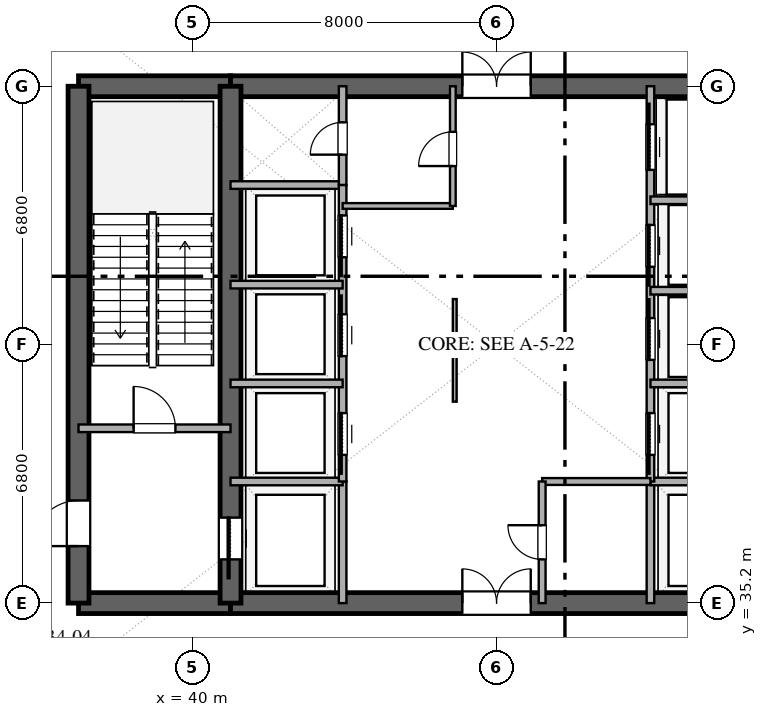
"""IFC4 building model, lengths in metres.
Left out: names, types, materials, properties, quantities, classifications, styles, units other than length and angle.
Written with IfcOpenShell. Run it as: python <this file> out.ifc"""

import sys

from ifc_helpers import new_model, si_unit, direction, frame, frame_2d, origin, place, context, subcontext, project, spatial, rectangle, extrude, element, fill, save


model = new_model("IFC4")
c1 = context("Model", 3, precision=1e-05, world=origin(), true_north=direction((0.0, 1.0)))
c2 = subcontext(c1, "Body", "Model", "MODEL_VIEW")
j1 = project(units=[si_unit("LENGTHUNIT", "METRE"), si_unit("PLANEANGLEUNIT", "RADIAN")], contexts=[c1])
p1 = place(None, origin())
s1 = spatial("IfcSite", under=j1, at=p1, CompositionType="ELEMENT")
p2 = place(p1, origin())
s2 = spatial("IfcBuilding", under=s1, at=p2, CompositionType="ELEMENT")
p3 = place(p2, frame((0.0, 0.0, 134.4)))
s3 = spatial("IfcBuildingStorey", under=s2, at=p3, CompositionType="ELEMENT", Elevation=134.4)
p4 = place(p3, frame((37.0, 35.2, 0.0), z_axis=(0.0, 0.0, 1.0), x_axis=(1.0, 0.0, 0.0)))
e1 = element("IfcWall", 1, at=p4, inside=s3, PredefinedType="SHEAR", context=c2, shape_type="SweptSolid", body=[
    extrude(rectangle(XDim=4.0, YDim=0.55, at=frame_2d((2.0, 0.0))), origin(), (0.0, 0.0, 1.0), 5.05),
])
p5 = place(p3, frame((41.0, 35.2, 0.0), z_axis=(0.0, 0.0, 1.0), x_axis=(1.0, 0.0, 0.0)))
e2 = element("IfcWall", 2, at=p5, inside=s3, PredefinedType="SHEAR", context=c2, shape_type="SweptSolid", body=[
    extrude(rectangle(XDim=14.0, YDim=0.55, at=frame_2d((7.0, 0.0))), origin(), (0.0, 0.0, 1.0), 5.05),
])
p6 = place(p5, frame((6.1, 0.0, 0.0)))
e3 = element("IfcOpeningElement", 3, at=p6, cuts=e2, PredefinedType="OPENING", context=c2, shape_type="SweptSolid", body=[
    extrude(rectangle(XDim=1.8, YDim=2.25, at=frame_2d((0.9, 1.125))), frame((0.0, 0.285, 0.0), z_axis=(0.0, -1.0, 0.0), x_axis=(1.0, 0.0, 0.0)), (0.0, 0.0, 1.0), 0.57),
])
p7 = place(p3, frame((37.0, 48.8, 0.0), z_axis=(0.0, 0.0, 1.0), x_axis=(1.0, 0.0, 0.0)))
e4 = element("IfcWall", 4, at=p7, inside=s3, PredefinedType="SHEAR", context=c2, shape_type="SweptSolid", body=[
    extrude(rectangle(XDim=4.0, YDim=0.55, at=frame_2d((2.0, 0.0))), origin(), (0.0, 0.0, 1.0), 5.05),
])
p8 = place(p3, frame((41.0, 48.8, 0.0), z_axis=(0.0, 0.0, 1.0), x_axis=(1.0, 0.0, 0.0)))
e5 = element("IfcWall", 5, at=p8, inside=s3, PredefinedType="SHEAR", context=c2, shape_type="SweptSolid", body=[
    extrude(rectangle(XDim=14.0, YDim=0.55, at=frame_2d((7.0, 0.0))), origin(), (0.0, 0.0, 1.0), 5.05),
])
p9 = place(p8, frame((6.1, 0.0, 0.0)))
e6 = element("IfcOpeningElement", 6, at=p9, cuts=e5, PredefinedType="OPENING", context=c2, shape_type="SweptSolid", body=[
    extrude(rectangle(XDim=1.8, YDim=2.25, at=frame_2d((0.9, 1.125))), frame((0.0, 0.285, 0.0), z_axis=(0.0, -1.0, 0.0), x_axis=(1.0, 0.0, 0.0)), (0.0, 0.0, 1.0), 0.57),
])
p10 = place(p3, frame((37.0, 35.2, 0.0), z_axis=(0.0, 0.0, 1.0), x_axis=(0.0, 1.0, 0.0)))
e7 = element("IfcWall", 7, at=p10, inside=s3, PredefinedType="SHEAR", context=c2, shape_type="SweptSolid", body=[
    extrude(rectangle(XDim=13.6, YDim=0.55, at=frame_2d((6.8, 0.0))), origin(), (0.0, 0.0, 1.0), 5.05),
])
p11 = place(p10, frame((1.5, 0.0, 0.0)))
e8 = element("IfcOpeningElement", 8, at=p11, cuts=e7, PredefinedType="OPENING", context=c2, shape_type="SweptSolid", body=[
    extrude(rectangle(XDim=1.2, YDim=2.15, at=frame_2d((0.6, 1.075))), frame((0.0, 0.285, 0.0), z_axis=(0.0, -1.0, 0.0), x_axis=(1.0, 0.0, 0.0)), (0.0, 0.0, 1.0), 0.57),
])
p12 = place(p3, frame((41.0, 35.2, 0.0), z_axis=(0.0, 0.0, 1.0), x_axis=(0.0, 1.0, 0.0)))
e9 = element("IfcWall", 9, at=p12, inside=s3, PredefinedType="SHEAR", context=c2, shape_type="SweptSolid", body=[
    extrude(rectangle(XDim=13.6, YDim=0.55, at=frame_2d((6.8, 0.0))), origin(), (0.0, 0.0, 1.0), 5.05),
])
p13 = place(p12, frame((1.15, 0.0, 0.0)))
e10 = element("IfcOpeningElement", 10, at=p13, cuts=e9, PredefinedType="OPENING", context=c2, shape_type="SweptSolid", body=[
    extrude(rectangle(XDim=1.1, YDim=2.2, at=frame_2d((0.55, 1.1))), frame((0.0, 0.285, 0.0), z_axis=(0.0, -1.0, 0.0), x_axis=(1.0, 0.0, 0.0)), (0.0, 0.0, 1.0), 0.57),
])
p14 = place(p3, frame((37.0, 39.8, 0.0), z_axis=(0.0, 0.0, 1.0), x_axis=(1.0, 0.0, 0.0)))
e11 = element("IfcWall", 11, at=p14, inside=s3, PredefinedType="SOLIDWALL", context=c2, shape_type="SweptSolid", body=[
    extrude(rectangle(XDim=4.0, YDim=0.2, at=frame_2d((2.0, 0.0))), origin(), (0.0, 0.0, 1.0), 4.35),
])
p15 = place(p14, frame((1.45, 0.0, 0.0)))
e12 = element("IfcOpeningElement", 12, at=p15, cuts=e11, PredefinedType="OPENING", context=c2, shape_type="SweptSolid", body=[
    extrude(rectangle(XDim=1.1, YDim=2.15, at=frame_2d((0.55, 1.075))), frame((0.0, 0.11, 0.0), z_axis=(0.0, -1.0, 0.0), x_axis=(1.0, 0.0, 0.0)), (0.0, 0.0, 1.0), 0.22),
])
p16 = place(p3, frame((43.95, 35.2, 0.0), z_axis=(0.0, 0.0, 1.0), x_axis=(0.0, 1.0, 0.0)))
e13 = element("IfcWall", 13, at=p16, inside=s3, PredefinedType="SOLIDWALL", context=c2, shape_type="SweptSolid", body=[
    extrude(rectangle(XDim=3.2, YDim=0.2, at=frame_2d((1.6, 0.0))), origin(), (0.0, 0.0, 1.0), 4.35),
])
p17 = place(p3, frame((41.0, 38.4, 0.0), z_axis=(0.0, 0.0, 1.0), x_axis=(1.0, 0.0, 0.0)))
e14 = element("IfcWall", 14, at=p17, inside=s3, PredefinedType="SOLIDWALL", context=c2, shape_type="SweptSolid", body=[
    extrude(rectangle(XDim=2.95, YDim=0.2, at=frame_2d((1.475, 0.0))), origin(), (0.0, 0.0, 1.0), 4.35),
])
p18 = place(p3, frame((52.05, 35.2, 0.0), z_axis=(0.0, 0.0, 1.0), x_axis=(0.0, 1.0, 0.0)))
e15 = element("IfcWall", 15, at=p18, inside=s3, PredefinedType="SOLIDWALL", context=c2, shape_type="SweptSolid", body=[
    extrude(rectangle(XDim=3.2, YDim=0.2, at=frame_2d((1.6, 0.0))), origin(), (0.0, 0.0, 1.0), 4.35),
])
for number, where, z_axis, x_axis in (
    (16, (52.05, 38.4, 0.0), (0.0, 0.0, 1.0), (1.0, 0.0, 0.0)),
    (17, (41.0, 46.2, 0.0), (0.0, 0.0, 1.0), (1.0, 0.0, 0.0)),
):
    element("IfcWall", number, at=place(p3, frame(where, z_axis=z_axis, x_axis=x_axis)), inside=s3, PredefinedType="SOLIDWALL", context=c2, shape_type="SweptSolid", body=[
        extrude(rectangle(XDim=2.95, YDim=0.2, at=frame_2d((1.475, 0.0))), origin(), (0.0, 0.0, 1.0), 4.35),
    ])
p19 = place(p3, frame((43.95, 46.2, 0.0), z_axis=(0.0, 0.0, 1.0), x_axis=(0.0, 1.0, 0.0)))
e18 = element("IfcWall", 18, at=p19, inside=s3, PredefinedType="SOLIDWALL", context=c2, shape_type="SweptSolid", body=[
    extrude(rectangle(XDim=2.6, YDim=0.2, at=frame_2d((1.3, 0.0))), origin(), (0.0, 0.0, 1.0), 4.35),
])
p20 = place(p19, frame((0.8, 0.0, 0.0)))
e19 = element("IfcOpeningElement", 19, at=p20, cuts=e18, PredefinedType="OPENING", context=c2, shape_type="SweptSolid", body=[
    extrude(rectangle(XDim=0.85, YDim=2.15, at=frame_2d((0.425, 1.075))), frame((0.0, 0.11, 0.0), z_axis=(0.0, -1.0, 0.0), x_axis=(1.0, 0.0, 0.0)), (0.0, 0.0, 1.0), 0.22),
])
p21 = place(p3, frame((43.95, 38.4, 0.0), z_axis=(0.0, 0.0, 1.0), x_axis=(0.0, 1.0, 0.0)))
e20 = element("IfcWall", 20, at=p21, inside=s3, PredefinedType="SOLIDWALL", context=c2, shape_type="SweptSolid", body=[
    extrude(rectangle(XDim=7.8, YDim=0.2, at=frame_2d((3.9, 0.0))), origin(), (0.0, 0.0, 1.0), 4.35),
])
p22 = place(p21, frame((0.7, 0.0, 0.0)))
e21 = element("IfcOpeningElement", 21, at=p22, cuts=e20, PredefinedType="OPENING", context=c2, shape_type="SweptSolid", body=[
    extrude(rectangle(XDim=1.1, YDim=2.2, at=frame_2d((0.55, 1.1))), frame((0.0, 0.11, 0.0), z_axis=(0.0, -1.0, 0.0), x_axis=(1.0, 0.0, 0.0)), (0.0, 0.0, 1.0), 0.22),
])
p23 = place(p21, frame((3.3, 0.0, 0.0)))
e22 = element("IfcOpeningElement", 22, at=p23, cuts=e20, PredefinedType="OPENING", context=c2, shape_type="SweptSolid", body=[
    extrude(rectangle(XDim=1.1, YDim=2.2, at=frame_2d((0.55, 1.1))), frame((0.0, 0.11, 0.0), z_axis=(0.0, -1.0, 0.0), x_axis=(1.0, 0.0, 0.0)), (0.0, 0.0, 1.0), 0.22),
])
p24 = place(p21, frame((5.9, 0.0, 0.0)))
e23 = element("IfcOpeningElement", 23, at=p24, cuts=e20, PredefinedType="OPENING", context=c2, shape_type="SweptSolid", body=[
    extrude(rectangle(XDim=1.1, YDim=2.2, at=frame_2d((0.55, 1.1))), frame((0.0, 0.11, 0.0), z_axis=(0.0, -1.0, 0.0), x_axis=(1.0, 0.0, 0.0)), (0.0, 0.0, 1.0), 0.22),
])
for number, where, z_axis, x_axis in (
    (24, (41.0, 40.98, 0.0), (0.0, 0.0, 1.0), (1.0, 0.0, 0.0)),
    (25, (41.0, 43.58, 0.0), (0.0, 0.0, 1.0), (1.0, 0.0, 0.0)),
):
    element("IfcWall", number, at=place(p3, frame(where, z_axis=z_axis, x_axis=x_axis)), inside=s3, PredefinedType="SOLIDWALL", context=c2, shape_type="SweptSolid", body=[
        extrude(rectangle(XDim=2.95, YDim=0.2, at=frame_2d((1.475, 0.0))), origin(), (0.0, 0.0, 1.0), 4.35),
    ])
p25 = place(p3, frame((52.05, 38.4, 0.0), z_axis=(0.0, 0.0, 1.0), x_axis=(0.0, 1.0, 0.0)))
e26 = element("IfcWall", 26, at=p25, inside=s3, PredefinedType="SOLIDWALL", context=c2, shape_type="SweptSolid", body=[
    extrude(rectangle(XDim=10.4, YDim=0.2, at=frame_2d((5.2, 0.0))), origin(), (0.0, 0.0, 1.0), 4.35),
])
p26 = place(p25, frame((0.7, 0.0, 0.0)))
e27 = element("IfcOpeningElement", 27, at=p26, cuts=e26, PredefinedType="OPENING", context=c2, shape_type="SweptSolid", body=[
    extrude(rectangle(XDim=1.1, YDim=2.2, at=frame_2d((0.55, 1.1))), frame((0.0, 0.11, 0.0), z_axis=(0.0, -1.0, 0.0), x_axis=(1.0, 0.0, 0.0)), (0.0, 0.0, 1.0), 0.22),
])
p27 = place(p25, frame((3.2, 0.0, 0.0)))
e28 = element("IfcOpeningElement", 28, at=p27, cuts=e26, PredefinedType="OPENING", context=c2, shape_type="SweptSolid", body=[
    extrude(rectangle(XDim=1.1, YDim=2.2, at=frame_2d((0.55, 1.1))), frame((0.0, 0.11, 0.0), z_axis=(0.0, -1.0, 0.0), x_axis=(1.0, 0.0, 0.0)), (0.0, 0.0, 1.0), 0.22),
])
p28 = place(p25, frame((5.65, 0.0, 0.0)))
e29 = element("IfcOpeningElement", 29, at=p28, cuts=e26, PredefinedType="OPENING", context=c2, shape_type="SweptSolid", body=[
    extrude(rectangle(XDim=1.1, YDim=2.2, at=frame_2d((0.55, 1.1))), frame((0.0, 0.11, 0.0), z_axis=(0.0, -1.0, 0.0), x_axis=(1.0, 0.0, 0.0)), (0.0, 0.0, 1.0), 0.22),
])
p29 = place(p25, frame((8.2, 0.0, 0.0)))
e30 = element("IfcOpeningElement", 30, at=p29, cuts=e26, PredefinedType="OPENING", context=c2, shape_type="SweptSolid", body=[
    extrude(rectangle(XDim=1.2, YDim=2.2, at=frame_2d((0.6, 1.1))), frame((0.0, 0.11, 0.0), z_axis=(0.0, -1.0, 0.0), x_axis=(1.0, 0.0, 0.0)), (0.0, 0.0, 1.0), 0.22),
])
for number, where, z_axis, x_axis in (
    (31, (52.05, 40.98, 0.0), (0.0, 0.0, 1.0), (1.0, 0.0, 0.0)),
    (32, (52.05, 43.42, 0.0), (0.0, 0.0, 1.0), (1.0, 0.0, 0.0)),
    (33, (52.05, 45.8, 0.0), (0.0, 0.0, 1.0), (1.0, 0.0, 0.0)),
):
    element("IfcWall", number, at=place(p3, frame(where, z_axis=z_axis, x_axis=x_axis)), inside=s3, PredefinedType="SOLIDWALL", context=c2, shape_type="SweptSolid", body=[
        extrude(rectangle(XDim=2.95, YDim=0.2, at=frame_2d((1.475, 0.0))), origin(), (0.0, 0.0, 1.0), 4.35),
    ])
p30 = place(p3, frame((43.95, 45.65, 0.0), z_axis=(0.0, 0.0, 1.0), x_axis=(1.0, 0.0, 0.0)))
e34 = element("IfcWall", 34, at=p30, inside=s3, PredefinedType="PARTITIONING", context=c2, shape_type="SweptSolid", body=[
    extrude(rectangle(XDim=2.9, YDim=0.15, at=frame_2d((1.45, 0.0))), origin(), (0.0, 0.0, 1.0), 4.35),
])
p31 = place(p3, frame((46.85, 45.65, 0.0), z_axis=(0.0, 0.0, 1.0), x_axis=(0.0, 1.0, 0.0)))
e35 = element("IfcWall", 35, at=p31, inside=s3, PredefinedType="PARTITIONING", context=c2, shape_type="SweptSolid", body=[
    extrude(rectangle(XDim=3.15, YDim=0.15, at=frame_2d((1.575, 0.0))), origin(), (0.0, 0.0, 1.0), 4.35),
])
p32 = place(p31, frame((1.05, 0.0, 0.0)))
e36 = element("IfcOpeningElement", 36, at=p32, cuts=e35, PredefinedType="OPENING", context=c2, shape_type="SweptSolid", body=[
    extrude(rectangle(XDim=0.9, YDim=2.15, at=frame_2d((0.45, 1.075))), frame((0.0, 0.085, 0.0), z_axis=(0.0, -1.0, 0.0), x_axis=(1.0, 0.0, 0.0)), (0.0, 0.0, 1.0), 0.17),
])
p33 = place(p3, frame((49.2, 38.4, 0.0), z_axis=(0.0, 0.0, 1.0), x_axis=(1.0, 0.0, 0.0)))
e37 = element("IfcWall", 37, at=p33, inside=s3, PredefinedType="PLUMBINGWALL", context=c2, shape_type="SweptSolid", body=[
    extrude(rectangle(XDim=2.85, YDim=0.18, at=frame_2d((1.425, 0.0))), origin(), (0.0, 0.0, 1.0), 4.35),
])
p34 = place(p3, frame((49.2, 35.2, 0.0), z_axis=(0.0, 0.0, 1.0), x_axis=(0.0, 1.0, 0.0)))
e38 = element("IfcWall", 38, at=p34, inside=s3, PredefinedType="PLUMBINGWALL", context=c2, shape_type="SweptSolid", body=[
    extrude(rectangle(XDim=3.2, YDim=0.18, at=frame_2d((1.6, 0.0))), origin(), (0.0, 0.0, 1.0), 4.35),
])
p35 = place(p34, frame((1.15, 0.0, 0.0)))
e39 = element("IfcOpeningElement", 39, at=p35, cuts=e38, PredefinedType="OPENING", context=c2, shape_type="SweptSolid", body=[
    extrude(rectangle(XDim=0.9, YDim=2.1, at=frame_2d((0.45, 1.05))), frame((0.0, 0.1, 0.0), z_axis=(0.0, -1.0, 0.0), x_axis=(1.0, 0.0, 0.0)), (0.0, 0.0, 1.0), 0.2),
])
p36 = place(p3, frame((46.9, 40.5, 0.0), z_axis=(0.0, 0.0, 1.0), x_axis=(0.0, 1.0, 0.0)))
e40 = element("IfcWall", 40, at=p36, inside=s3, PredefinedType="MOVABLE", context=c2, shape_type="SweptSolid", body=[
    extrude(rectangle(XDim=2.7, YDim=0.1, at=frame_2d((1.35, 0.0))), origin(), (0.0, 0.0, 1.0), 4.35),
])
p37 = place(p13, origin())
e41 = element("IfcDoor", 41, at=p37, inside=s3, OperationType="SLIDING_TO_LEFT", PredefinedType="DOOR", context=c2, shape_type="SweptSolid", body=[
    extrude(rectangle(XDim=1.1, YDim=2.2, at=frame_2d((0.55, 1.1))), frame((0.0, 0.025, 0.0), z_axis=(0.0, -1.0, 0.0), x_axis=(1.0, 0.0, 0.0)), (0.0, 0.0, 1.0), 0.05),
])
fill(e10, e41)
p38 = place(p11, origin())
e42 = element("IfcDoor", 42, at=p38, inside=s3, OperationType="SINGLE_SWING_LEFT", PredefinedType="DOOR", context=c2, shape_type="SweptSolid", body=[
    extrude(rectangle(XDim=1.2, YDim=2.15, at=frame_2d((0.6, 1.075))), frame((0.0, 0.025, 0.0), z_axis=(0.0, -1.0, 0.0), x_axis=(1.0, 0.0, 0.0)), (0.0, 0.0, 1.0), 0.05),
])
fill(e8, e42)
p39 = place(p6, origin())
e43 = element("IfcDoor", 43, at=p39, inside=s3, OperationType="DOUBLE_DOOR_SINGLE_SWING", PredefinedType="DOOR", context=c2, shape_type="SweptSolid", body=[
    extrude(rectangle(XDim=1.8, YDim=2.25, at=frame_2d((0.9, 1.125))), frame((0.0, 0.025, 0.0), z_axis=(0.0, -1.0, 0.0), x_axis=(1.0, 0.0, 0.0)), (0.0, 0.0, 1.0), 0.05),
])
fill(e3, e43)
p40 = place(p9, origin())
e44 = element("IfcDoor", 44, at=p40, inside=s3, OperationType="DOUBLE_DOOR_SINGLE_SWING", PredefinedType="DOOR", context=c2, shape_type="SweptSolid", body=[
    extrude(rectangle(XDim=1.8, YDim=2.25, at=frame_2d((0.9, 1.125))), frame((0.0, 0.025, 0.0), z_axis=(0.0, -1.0, 0.0), x_axis=(1.0, 0.0, 0.0)), (0.0, 0.0, 1.0), 0.05),
])
fill(e6, e44)
p41 = place(p15, origin())
e45 = element("IfcDoor", 45, at=p41, inside=s3, OperationType="SINGLE_SWING_LEFT", PredefinedType="DOOR", context=c2, shape_type="SweptSolid", body=[
    extrude(rectangle(XDim=1.1, YDim=2.15, at=frame_2d((0.55, 1.075))), frame((0.0, 0.025, 0.0), z_axis=(0.0, -1.0, 0.0), x_axis=(1.0, 0.0, 0.0)), (0.0, 0.0, 1.0), 0.05),
])
fill(e12, e45)
p42 = place(p20, origin())
e46 = element("IfcDoor", 46, at=p42, inside=s3, OperationType="SINGLE_SWING_LEFT", PredefinedType="DOOR", context=c2, shape_type="SweptSolid", body=[
    extrude(rectangle(XDim=0.85, YDim=2.15, at=frame_2d((0.425, 1.075))), frame((0.0, 0.025, 0.0), z_axis=(0.0, -1.0, 0.0), x_axis=(1.0, 0.0, 0.0)), (0.0, 0.0, 1.0), 0.05),
])
fill(e19, e46)
p43 = place(p22, origin())
e47 = element("IfcDoor", 47, at=p43, inside=s3, OperationType="SLIDING_TO_LEFT", PredefinedType="DOOR", context=c2, shape_type="SweptSolid", body=[
    extrude(rectangle(XDim=1.1, YDim=2.2, at=frame_2d((0.55, 1.1))), frame((0.0, 0.025, 0.0), z_axis=(0.0, -1.0, 0.0), x_axis=(1.0, 0.0, 0.0)), (0.0, 0.0, 1.0), 0.05),
])
fill(e21, e47)
p44 = place(p23, origin())
e48 = element("IfcDoor", 48, at=p44, inside=s3, OperationType="SLIDING_TO_RIGHT", PredefinedType="DOOR", context=c2, shape_type="SweptSolid", body=[
    extrude(rectangle(XDim=1.1, YDim=2.2, at=frame_2d((0.55, 1.1))), frame((0.0, 0.025, 0.0), z_axis=(0.0, -1.0, 0.0), x_axis=(1.0, 0.0, 0.0)), (0.0, 0.0, 1.0), 0.05),
])
fill(e22, e48)
p45 = place(p24, origin())
e49 = element("IfcDoor", 49, at=p45, inside=s3, OperationType="SLIDING_TO_LEFT", PredefinedType="DOOR", context=c2, shape_type="SweptSolid", body=[
    extrude(rectangle(XDim=1.1, YDim=2.2, at=frame_2d((0.55, 1.1))), frame((0.0, 0.025, 0.0), z_axis=(0.0, -1.0, 0.0), x_axis=(1.0, 0.0, 0.0)), (0.0, 0.0, 1.0), 0.05),
])
fill(e23, e49)
p46 = place(p26, origin())
e50 = element("IfcDoor", 50, at=p46, inside=s3, OperationType="SLIDING_TO_LEFT", PredefinedType="DOOR", context=c2, shape_type="SweptSolid", body=[
    extrude(rectangle(XDim=1.1, YDim=2.2, at=frame_2d((0.55, 1.1))), frame((0.0, 0.025, 0.0), z_axis=(0.0, -1.0, 0.0), x_axis=(1.0, 0.0, 0.0)), (0.0, 0.0, 1.0), 0.05),
])
fill(e27, e50)
p47 = place(p27, origin())
e51 = element("IfcDoor", 51, at=p47, inside=s3, OperationType="SLIDING_TO_RIGHT", PredefinedType="DOOR", context=c2, shape_type="SweptSolid", body=[
    extrude(rectangle(XDim=1.1, YDim=2.2, at=frame_2d((0.55, 1.1))), frame((0.0, 0.025, 0.0), z_axis=(0.0, -1.0, 0.0), x_axis=(1.0, 0.0, 0.0)), (0.0, 0.0, 1.0), 0.05),
])
fill(e28, e51)
p48 = place(p28, origin())
e52 = element("IfcDoor", 52, at=p48, inside=s3, OperationType="SLIDING_TO_LEFT", PredefinedType="DOOR", context=c2, shape_type="SweptSolid", body=[
    extrude(rectangle(XDim=1.1, YDim=2.2, at=frame_2d((0.55, 1.1))), frame((0.0, 0.025, 0.0), z_axis=(0.0, -1.0, 0.0), x_axis=(1.0, 0.0, 0.0)), (0.0, 0.0, 1.0), 0.05),
])
fill(e29, e52)
p49 = place(p29, origin())
e53 = element("IfcDoor", 53, at=p49, inside=s3, OperationType="SLIDING_TO_RIGHT", PredefinedType="DOOR", context=c2, shape_type="SweptSolid", body=[
    extrude(rectangle(XDim=1.2, YDim=2.2, at=frame_2d((0.6, 1.1))), frame((0.0, 0.025, 0.0), z_axis=(0.0, -1.0, 0.0), x_axis=(1.0, 0.0, 0.0)), (0.0, 0.0, 1.0), 0.05),
])
fill(e30, e53)
p50 = place(p32, origin())
e54 = element("IfcDoor", 54, at=p50, inside=s3, OperationType="SINGLE_SWING_LEFT", PredefinedType="DOOR", context=c2, shape_type="SweptSolid", body=[
    extrude(rectangle(XDim=0.9, YDim=2.15, at=frame_2d((0.45, 1.075))), frame((0.0, 0.025, 0.0), z_axis=(0.0, -1.0, 0.0), x_axis=(1.0, 0.0, 0.0)), (0.0, 0.0, 1.0), 0.05),
])
fill(e36, e54)
p51 = place(p35, origin())
e55 = element("IfcDoor", 55, at=p51, inside=s3, OperationType="SINGLE_SWING_RIGHT", PredefinedType="DOOR", context=c2, shape_type="SweptSolid", body=[
    extrude(rectangle(XDim=0.9, YDim=2.1, at=frame_2d((0.45, 1.05))), frame((0.0, 0.025, 0.0), z_axis=(0.0, -1.0, 0.0), x_axis=(1.0, 0.0, 0.0)), (0.0, 0.0, 1.0), 0.05),
])
fill(e39, e55)
save(model, sys.argv[1])
